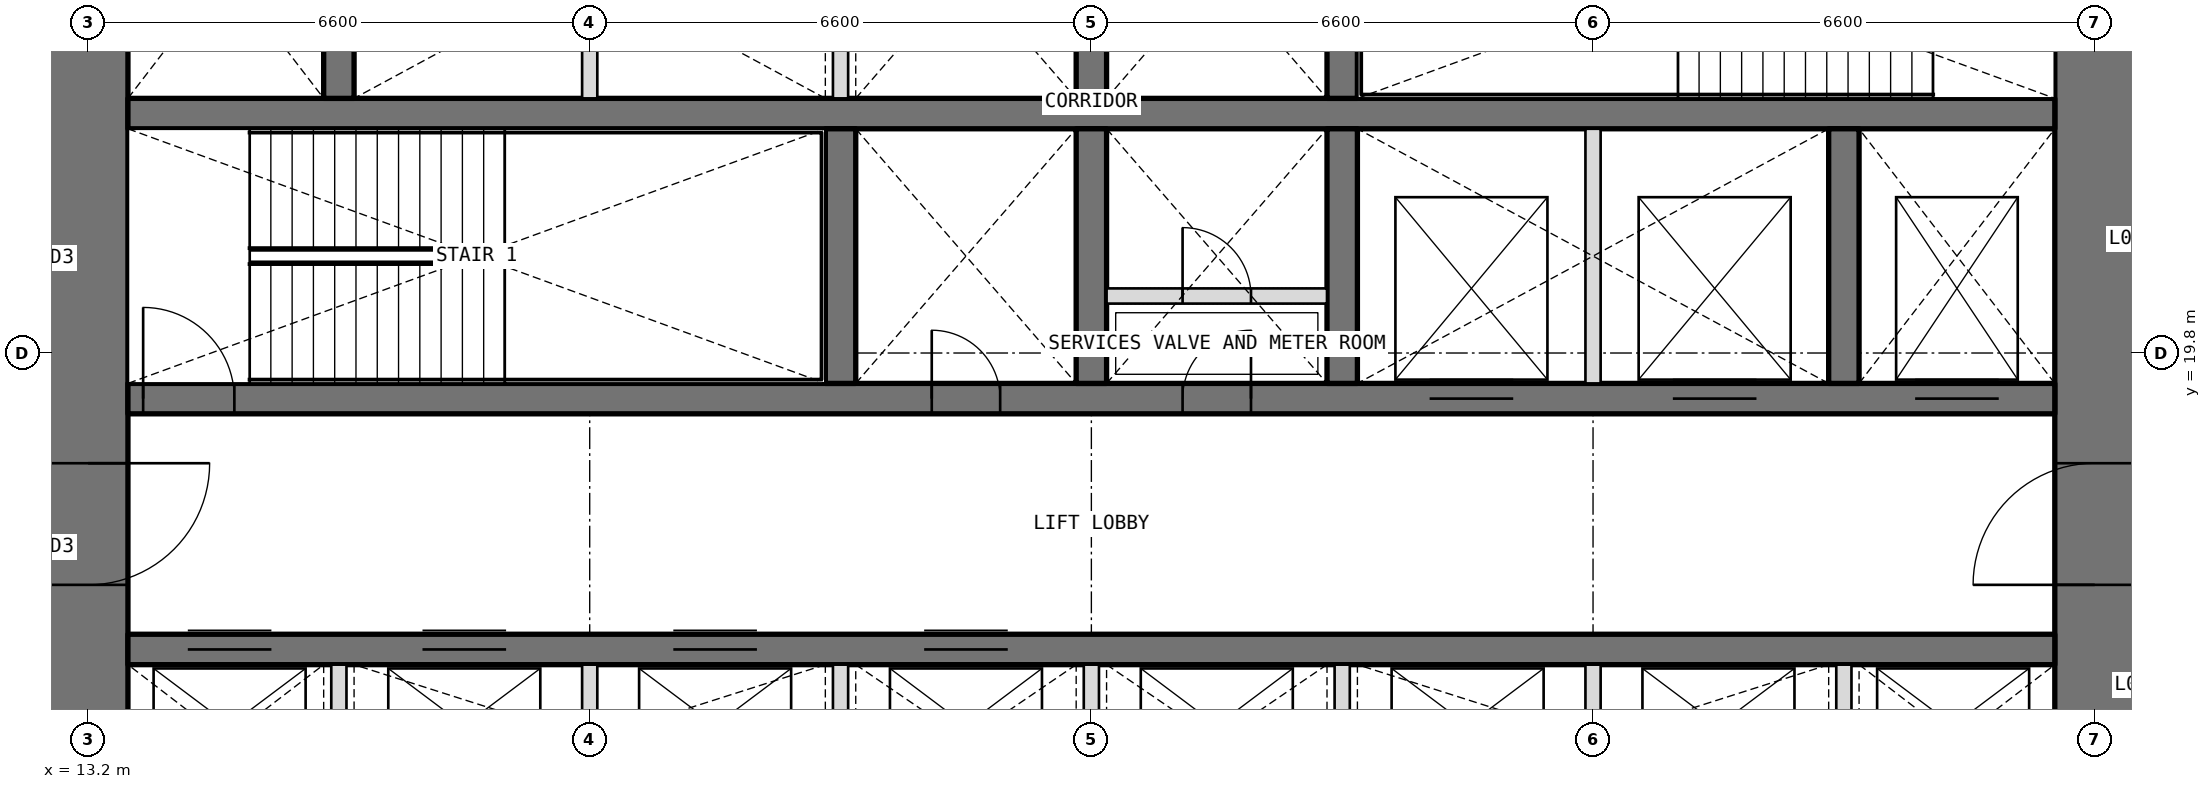
"""IFC4 building model, lengths in metres.
Left out: names, types, materials, properties, quantities, classifications, styles, units other than length and angle.
Written with IfcOpenShell. Run it as: python <this file> out.ifc"""

import sys

from ifc_helpers import new_model, si_unit, direction, frame, frame_2d, origin, place, context, subcontext, project, spatial, rectangle, extrude, element, fill, save


model = new_model("IFC4")
c1 = context("Model", 3, precision=1e-05, world=origin(), true_north=direction((0.0, 1.0)))
c2 = subcontext(c1, "Body", "Model", "MODEL_VIEW")
j1 = project(units=[si_unit("LENGTHUNIT", "METRE"), si_unit("PLANEANGLEUNIT", "RADIAN")], contexts=[c1])
p1 = place(None, origin())
s1 = spatial("IfcSite", under=j1, at=p1, CompositionType="ELEMENT")
p2 = place(p1, origin())
s2 = spatial("IfcBuilding", under=s1, at=p2, CompositionType="ELEMENT")
p3 = place(p2, frame((0.0, 0.0, 12.6)))
s3 = spatial("IfcBuildingStorey", under=s2, at=p3, CompositionType="ELEMENT", Elevation=12.6)
p4 = place(p3, frame((39.6, 13.725, 0.0), z_axis=(0.0, 0.0, 1.0), x_axis=(0.0, 1.0, 0.0)))
e1 = element("IfcWall", 1, at=p4, inside=s3, PredefinedType="SHEAR", context=c2, shape_type="SweptSolid", body=[
    extrude(rectangle(XDim=18.75, YDim=1.05, at=frame_2d((9.375, 0.0))), origin(), (0.0, 0.0, 1.0), 4.5),
])
p5 = place(p4, frame((3.025, 0.0, 0.0)))
e2 = element("IfcOpeningElement", 2, at=p5, cuts=e1, PredefinedType="OPENING", context=c2, shape_type="SweptSolid", body=[
    extrude(rectangle(XDim=1.6, YDim=2.1, at=frame_2d((0.8, 1.05))), frame((0.0, 0.535, 0.0), z_axis=(0.0, -1.0, 0.0), x_axis=(1.0, 0.0, 0.0)), (0.0, 0.0, 1.0), 1.07),
])
p6 = place(p4, frame((13.825, 0.0, 0.0)))
e3 = element("IfcOpeningElement", 3, at=p6, cuts=e1, PredefinedType="OPENING", context=c2, shape_type="SweptSolid", body=[
    extrude(rectangle(XDim=1.6, YDim=2.1, at=frame_2d((0.8, 1.05))), frame((0.0, 0.535, 0.0), z_axis=(0.0, -1.0, 0.0), x_axis=(1.0, 0.0, 0.0)), (0.0, 0.0, 1.0), 1.07),
])
p7 = place(p3, frame((13.2, 32.475, 0.0), z_axis=(0.0, 0.0, 1.0), x_axis=(0.0, -1.0, 0.0)))
e4 = element("IfcWall", 4, at=p7, inside=s3, PredefinedType="SHEAR", context=c2, shape_type="SweptSolid", body=[
    extrude(rectangle(XDim=18.75, YDim=1.05, at=frame_2d((9.375, 0.0))), origin(), (0.0, 0.0, 1.0), 4.5),
])
p8 = place(p7, frame((14.125, 0.0, 0.0)))
e5 = element("IfcOpeningElement", 5, at=p8, cuts=e4, PredefinedType="OPENING", context=c2, shape_type="SweptSolid", body=[
    extrude(rectangle(XDim=1.6, YDim=2.1, at=frame_2d((0.8, 1.05))), frame((0.0, 0.535, 0.0), z_axis=(0.0, -1.0, 0.0), x_axis=(1.0, 0.0, 0.0)), (0.0, 0.0, 1.0), 1.07),
])
p9 = place(p7, frame((3.325, 0.0, 0.0)))
e6 = element("IfcOpeningElement", 6, at=p9, cuts=e4, PredefinedType="OPENING", context=c2, shape_type="SweptSolid", body=[
    extrude(rectangle(XDim=1.6, YDim=2.1, at=frame_2d((0.8, 1.05))), frame((0.0, 0.535, 0.0), z_axis=(0.0, -1.0, 0.0), x_axis=(1.0, 0.0, 0.0)), (0.0, 0.0, 1.0), 1.07),
])
p10 = place(p3, frame((13.725, 15.9, 0.0), z_axis=(0.0, 0.0, 1.0), x_axis=(1.0, 0.0, 0.0)))
e7 = element("IfcWall", 7, at=p10, inside=s3, PredefinedType="SHEAR", context=c2, shape_type="SweptSolid", body=[
    extrude(rectangle(XDim=25.35, YDim=0.4, at=frame_2d((12.675, 0.0))), origin(), (0.0, 0.0, 1.0), 4.5),
])
p11 = place(p10, frame((0.788, 0.0, 0.0)))
e8 = element("IfcOpeningElement", 8, at=p11, cuts=e7, PredefinedType="OPENING", context=c2, shape_type="SweptSolid", body=[
    extrude(rectangle(XDim=1.1, YDim=2.1, at=frame_2d((0.55, 1.05))), frame((0.0, 0.21, 0.0), z_axis=(0.0, -1.0, 0.0), x_axis=(1.0, 0.0, 0.0)), (0.0, 0.0, 1.0), 0.42),
])
p12 = place(p10, frame((3.875, 0.0, 0.0)))
e9 = element("IfcOpeningElement", 9, at=p12, cuts=e7, PredefinedType="OPENING", context=c2, shape_type="SweptSolid", body=[
    extrude(rectangle(XDim=1.1, YDim=2.1, at=frame_2d((0.55, 1.05))), frame((0.0, 0.21, 0.0), z_axis=(0.0, -1.0, 0.0), x_axis=(1.0, 0.0, 0.0)), (0.0, 0.0, 1.0), 0.42),
])
p13 = place(p10, frame((7.175, 0.0, 0.0)))
e10 = element("IfcOpeningElement", 10, at=p13, cuts=e7, PredefinedType="OPENING", context=c2, shape_type="SweptSolid", body=[
    extrude(rectangle(XDim=1.1, YDim=2.1, at=frame_2d((0.55, 1.05))), frame((0.0, 0.21, 0.0), z_axis=(0.0, -1.0, 0.0), x_axis=(1.0, 0.0, 0.0)), (0.0, 0.0, 1.0), 0.42),
])
p14 = place(p10, frame((10.475, 0.0, 0.0)))
e11 = element("IfcOpeningElement", 11, at=p14, cuts=e7, PredefinedType="OPENING", context=c2, shape_type="SweptSolid", body=[
    extrude(rectangle(XDim=1.1, YDim=2.1, at=frame_2d((0.55, 1.05))), frame((0.0, 0.21, 0.0), z_axis=(0.0, -1.0, 0.0), x_axis=(1.0, 0.0, 0.0)), (0.0, 0.0, 1.0), 0.42),
])
p15 = place(p3, frame((13.725, 19.2, 0.0), z_axis=(0.0, 0.0, 1.0), x_axis=(1.0, 0.0, 0.0)))
e12 = element("IfcWall", 12, at=p15, inside=s3, PredefinedType="SHEAR", context=c2, shape_type="SweptSolid", body=[
    extrude(rectangle(XDim=25.35, YDim=0.4, at=frame_2d((12.675, 0.0))), origin(), (0.0, 0.0, 1.0), 4.5),
])
p16 = place(p15, frame((10.575, 0.0, 0.0)))
e13 = element("IfcOpeningElement", 13, at=p16, cuts=e12, PredefinedType="OPENING", context=c2, shape_type="SweptSolid", body=[
    extrude(rectangle(XDim=0.9, YDim=2.1, at=frame_2d((0.45, 1.05))), frame((0.0, 0.21, 0.0), z_axis=(0.0, -1.0, 0.0), x_axis=(1.0, 0.0, 0.0)), (0.0, 0.0, 1.0), 0.42),
])
p17 = place(p15, frame((13.875, 0.0, 0.0)))
e14 = element("IfcOpeningElement", 14, at=p17, cuts=e12, PredefinedType="OPENING", context=c2, shape_type="SweptSolid", body=[
    extrude(rectangle(XDim=0.9, YDim=2.1, at=frame_2d((0.45, 1.05))), frame((0.0, 0.21, 0.0), z_axis=(0.0, -1.0, 0.0), x_axis=(1.0, 0.0, 0.0)), (0.0, 0.0, 1.0), 0.42),
])
p18 = place(p15, frame((0.2, 0.0, 0.0)))
e15 = element("IfcOpeningElement", 15, at=p18, cuts=e12, PredefinedType="OPENING", context=c2, shape_type="SweptSolid", body=[
    extrude(rectangle(XDim=1.2, YDim=2.1, at=frame_2d((0.6, 1.05))), frame((0.0, 0.21, 0.0), z_axis=(0.0, -1.0, 0.0), x_axis=(1.0, 0.0, 0.0)), (0.0, 0.0, 1.0), 0.42),
])
p19 = place(p15, frame((23.512, 0.0, 0.0)))
e16 = element("IfcOpeningElement", 16, at=p19, cuts=e12, PredefinedType="OPENING", context=c2, shape_type="SweptSolid", body=[
    extrude(rectangle(XDim=1.1, YDim=2.1, at=frame_2d((0.55, 1.05))), frame((0.0, 0.21, 0.0), z_axis=(0.0, -1.0, 0.0), x_axis=(1.0, 0.0, 0.0)), (0.0, 0.0, 1.0), 0.42),
])
p20 = place(p15, frame((17.125, 0.0, 0.0)))
e17 = element("IfcOpeningElement", 17, at=p20, cuts=e12, PredefinedType="OPENING", context=c2, shape_type="SweptSolid", body=[
    extrude(rectangle(XDim=1.1, YDim=2.1, at=frame_2d((0.55, 1.05))), frame((0.0, 0.21, 0.0), z_axis=(0.0, -1.0, 0.0), x_axis=(1.0, 0.0, 0.0)), (0.0, 0.0, 1.0), 0.42),
])
p21 = place(p15, frame((20.325, 0.0, 0.0)))
e18 = element("IfcOpeningElement", 18, at=p21, cuts=e12, PredefinedType="OPENING", context=c2, shape_type="SweptSolid", body=[
    extrude(rectangle(XDim=1.1, YDim=2.1, at=frame_2d((0.55, 1.05))), frame((0.0, 0.21, 0.0), z_axis=(0.0, -1.0, 0.0), x_axis=(1.0, 0.0, 0.0)), (0.0, 0.0, 1.0), 0.42),
])
p22 = place(p3, frame((13.725, 22.95, 0.0), z_axis=(0.0, 0.0, 1.0), x_axis=(1.0, 0.0, 0.0)))
e19 = element("IfcWall", 19, at=p22, inside=s3, PredefinedType="SHEAR", context=c2, shape_type="SweptSolid", body=[
    extrude(rectangle(XDim=25.35, YDim=0.4, at=frame_2d((12.675, 0.0))), origin(), (0.0, 0.0, 1.0), 4.5),
])
for number, where, z_axis, x_axis in (
    (20, (23.1, 19.4, 0.0), (0.0, 0.0, 1.0), (0.0, 1.0, 0.0)),
    (21, (26.4, 19.4, 0.0), (0.0, 0.0, 1.0), (0.0, 1.0, 0.0)),
    (22, (29.7, 19.4, 0.0), (0.0, 0.0, 1.0), (0.0, 1.0, 0.0)),
    (23, (36.3, 19.4, 0.0), (0.0, 0.0, 1.0), (0.0, 1.0, 0.0)),
    (24, (16.5, 23.15, 0.0), (0.0, 0.0, 1.0), (0.0, 1.0, 0.0)),
    (25, (26.4, 23.15, 0.0), (0.0, 0.0, 1.0), (0.0, 1.0, 0.0)),
    (26, (29.7, 23.15, 0.0), (0.0, 0.0, 1.0), (0.0, 1.0, 0.0)),
):
    element("IfcWall", number, at=place(p3, frame(where, z_axis=z_axis, x_axis=x_axis)), inside=s3, PredefinedType="SHEAR", context=c2, shape_type="SweptSolid", body=[
        extrude(rectangle(XDim=3.35, YDim=0.4, at=frame_2d((1.675, 0.0))), origin(), (0.0, 0.0, 1.0), 4.5),
    ])
for number, where, z_axis, x_axis in (
    (27, (16.5, 13.725, 0.0), (0.0, 0.0, 1.0), (0.0, 1.0, 0.0)),
    (28, (19.8, 13.725, 0.0), (0.0, 0.0, 1.0), (0.0, 1.0, 0.0)),
    (29, (23.1, 13.725, 0.0), (0.0, 0.0, 1.0), (0.0, 1.0, 0.0)),
    (30, (26.4, 13.725, 0.0), (0.0, 0.0, 1.0), (0.0, 1.0, 0.0)),
    (31, (29.7, 13.725, 0.0), (0.0, 0.0, 1.0), (0.0, 1.0, 0.0)),
    (32, (33.0, 13.725, 0.0), (0.0, 0.0, 1.0), (0.0, 1.0, 0.0)),
    (33, (36.3, 13.725, 0.0), (0.0, 0.0, 1.0), (0.0, 1.0, 0.0)),
):
    element("IfcWall", number, at=place(p3, frame(where, z_axis=z_axis, x_axis=x_axis)), inside=s3, PredefinedType="PARTITIONING", context=c2, shape_type="SweptSolid", body=[
        extrude(rectangle(XDim=1.975, YDim=0.2, at=frame_2d((0.987, 0.0))), origin(), (0.0, 0.0, 1.0), 4.5),
    ])
for number, where, z_axis, x_axis in (
    (34, (33.0, 19.4, 0.0), (0.0, 0.0, 1.0), (0.0, 1.0, 0.0)),
    (35, (19.8, 23.15, 0.0), (0.0, 0.0, 1.0), (0.0, 1.0, 0.0)),
    (36, (23.1, 23.15, 0.0), (0.0, 0.0, 1.0), (0.0, 1.0, 0.0)),
):
    element("IfcWall", number, at=place(p3, frame(where, z_axis=z_axis, x_axis=x_axis)), inside=s3, PredefinedType="PARTITIONING", context=c2, shape_type="SweptSolid", body=[
        extrude(rectangle(XDim=3.35, YDim=0.2, at=frame_2d((1.675, 0.0))), origin(), (0.0, 0.0, 1.0), 4.5),
    ])
p23 = place(p3, frame((26.6, 20.55, 0.0), z_axis=(0.0, 0.0, 1.0), x_axis=(1.0, 0.0, 0.0)))
e37 = element("IfcWall", 37, at=p23, inside=s3, PredefinedType="PARTITIONING", context=c2, shape_type="SweptSolid", body=[
    extrude(rectangle(XDim=2.9, YDim=0.2, at=frame_2d((1.45, 0.0))), origin(), (0.0, 0.0, 1.0), 4.2),
])
p24 = place(p23, frame((1.0, 0.0, 0.0)))
e38 = element("IfcOpeningElement", 38, at=p24, cuts=e37, PredefinedType="OPENING", context=c2, shape_type="SweptSolid", body=[
    extrude(rectangle(XDim=0.9, YDim=2.1, at=frame_2d((0.45, 1.05))), frame((0.0, 0.11, 0.0), z_axis=(0.0, -1.0, 0.0), x_axis=(1.0, 0.0, 0.0)), (0.0, 0.0, 1.0), 0.22),
])
p25 = place(p16, origin())
e39 = element("IfcDoor", 39, at=p25, inside=s3, OperationType="SINGLE_SWING_LEFT", PredefinedType="DOOR", context=c2, shape_type="SweptSolid", body=[
    extrude(rectangle(XDim=0.9, YDim=2.1, at=frame_2d((0.45, 1.05))), frame((0.0, 0.025, 0.0), z_axis=(0.0, -1.0, 0.0), x_axis=(1.0, 0.0, 0.0)), (0.0, 0.0, 1.0), 0.05),
])
fill(e13, e39)
p26 = place(p17, origin())
e40 = element("IfcDoor", 40, at=p26, inside=s3, OperationType="SINGLE_SWING_RIGHT", PredefinedType="DOOR", context=c2, shape_type="SweptSolid", body=[
    extrude(rectangle(XDim=0.9, YDim=2.1, at=frame_2d((0.45, 1.05))), frame((0.0, 0.025, 0.0), z_axis=(0.0, -1.0, 0.0), x_axis=(1.0, 0.0, 0.0)), (0.0, 0.0, 1.0), 0.05),
])
fill(e14, e40)
p27 = place(p24, origin())
e41 = element("IfcDoor", 41, at=p27, inside=s3, OperationType="SINGLE_SWING_LEFT", PredefinedType="DOOR", context=c2, shape_type="SweptSolid", body=[
    extrude(rectangle(XDim=0.9, YDim=2.1, at=frame_2d((0.45, 1.05))), frame((0.0, 0.025, 0.0), z_axis=(0.0, -1.0, 0.0), x_axis=(1.0, 0.0, 0.0)), (0.0, 0.0, 1.0), 0.05),
])
fill(e38, e41)
p28 = place(p18, origin())
e42 = element("IfcDoor", 42, at=p28, inside=s3, OperationType="SINGLE_SWING_LEFT", PredefinedType="DOOR", context=c2, shape_type="SweptSolid", body=[
    extrude(rectangle(XDim=1.2, YDim=2.1, at=frame_2d((0.6, 1.05))), frame((0.0, 0.025, 0.0), z_axis=(0.0, -1.0, 0.0), x_axis=(1.0, 0.0, 0.0)), (0.0, 0.0, 1.0), 0.05),
])
fill(e15, e42)
p29 = place(p8, origin())
e43 = element("IfcDoor", 43, at=p29, inside=s3, OperationType="DOUBLE_DOOR_DOUBLE_SWING", PredefinedType="DOOR", context=c2, shape_type="SweptSolid", body=[
    extrude(rectangle(XDim=1.6, YDim=2.1, at=frame_2d((0.8, 1.05))), frame((0.0, 0.025, 0.0), z_axis=(0.0, -1.0, 0.0), x_axis=(1.0, 0.0, 0.0)), (0.0, 0.0, 1.0), 0.05),
])
fill(e5, e43)
p30 = place(p5, origin())
e44 = element("IfcDoor", 44, at=p30, inside=s3, OperationType="DOUBLE_DOOR_DOUBLE_SWING", PredefinedType="DOOR", context=c2, shape_type="SweptSolid", body=[
    extrude(rectangle(XDim=1.6, YDim=2.1, at=frame_2d((0.8, 1.05))), frame((0.0, 0.025, 0.0), z_axis=(0.0, -1.0, 0.0), x_axis=(1.0, 0.0, 0.0)), (0.0, 0.0, 1.0), 0.05),
])
fill(e2, e44)
p31 = place(p11, origin())
e45 = element("IfcDoor", 45, at=p31, inside=s3, OperationType="DOUBLE_DOOR_SLIDING", PredefinedType="DOOR", context=c2, shape_type="SweptSolid", body=[
    extrude(rectangle(XDim=1.1, YDim=2.1, at=frame_2d((0.55, 1.05))), frame((0.0, 0.025, 0.0), z_axis=(0.0, -1.0, 0.0), x_axis=(1.0, 0.0, 0.0)), (0.0, 0.0, 1.0), 0.05),
])
fill(e8, e45)
p32 = place(p12, origin())
e46 = element("IfcDoor", 46, at=p32, inside=s3, OperationType="DOUBLE_DOOR_SLIDING", PredefinedType="DOOR", context=c2, shape_type="SweptSolid", body=[
    extrude(rectangle(XDim=1.1, YDim=2.1, at=frame_2d((0.55, 1.05))), frame((0.0, 0.025, 0.0), z_axis=(0.0, -1.0, 0.0), x_axis=(1.0, 0.0, 0.0)), (0.0, 0.0, 1.0), 0.05),
])
fill(e9, e46)
p33 = place(p13, origin())
e47 = element("IfcDoor", 47, at=p33, inside=s3, OperationType="DOUBLE_DOOR_SLIDING", PredefinedType="DOOR", context=c2, shape_type="SweptSolid", body=[
    extrude(rectangle(XDim=1.1, YDim=2.1, at=frame_2d((0.55, 1.05))), frame((0.0, 0.025, 0.0), z_axis=(0.0, -1.0, 0.0), x_axis=(1.0, 0.0, 0.0)), (0.0, 0.0, 1.0), 0.05),
])
fill(e10, e47)
p34 = place(p14, origin())
e48 = element("IfcDoor", 48, at=p34, inside=s3, OperationType="DOUBLE_DOOR_SLIDING", PredefinedType="DOOR", context=c2, shape_type="SweptSolid", body=[
    extrude(rectangle(XDim=1.1, YDim=2.1, at=frame_2d((0.55, 1.05))), frame((0.0, 0.025, 0.0), z_axis=(0.0, -1.0, 0.0), x_axis=(1.0, 0.0, 0.0)), (0.0, 0.0, 1.0), 0.05),
])
fill(e11, e48)
p35 = place(p19, origin())
e49 = element("IfcDoor", 49, at=p35, inside=s3, OperationType="DOUBLE_DOOR_SLIDING", PredefinedType="DOOR", context=c2, shape_type="SweptSolid", body=[
    extrude(rectangle(XDim=1.1, YDim=2.1, at=frame_2d((0.55, 1.05))), frame((0.0, 0.025, 0.0), z_axis=(0.0, -1.0, 0.0), x_axis=(1.0, 0.0, 0.0)), (0.0, 0.0, 1.0), 0.05),
])
fill(e16, e49)
p36 = place(p20, origin())
e50 = element("IfcDoor", 50, at=p36, inside=s3, OperationType="DOUBLE_DOOR_SLIDING", PredefinedType="DOOR", context=c2, shape_type="SweptSolid", body=[
    extrude(rectangle(XDim=1.1, YDim=2.1, at=frame_2d((0.55, 1.05))), frame((0.0, 0.025, 0.0), z_axis=(0.0, -1.0, 0.0), x_axis=(1.0, 0.0, 0.0)), (0.0, 0.0, 1.0), 0.05),
])
fill(e17, e50)
p37 = place(p21, origin())
e51 = element("IfcDoor", 51, at=p37, inside=s3, OperationType="DOUBLE_DOOR_SLIDING", PredefinedType="DOOR", context=c2, shape_type="SweptSolid", body=[
    extrude(rectangle(XDim=1.1, YDim=2.1, at=frame_2d((0.55, 1.05))), frame((0.0, 0.025, 0.0), z_axis=(0.0, -1.0, 0.0), x_axis=(1.0, 0.0, 0.0)), (0.0, 0.0, 1.0), 0.05),
])
fill(e18, e51)
save(model, sys.argv[1])
